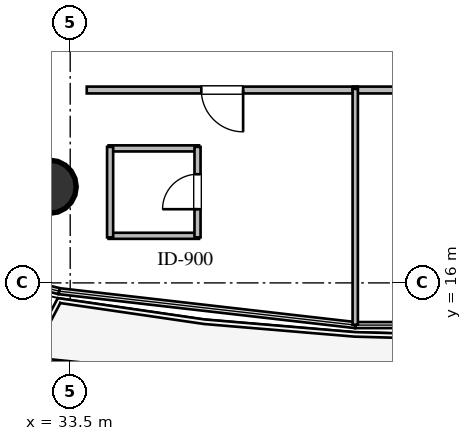
"""IFC4 building model, lengths in metres.
Left out: names, types, materials, properties, quantities, classifications, styles, units other than length and angle.
Written with IfcOpenShell. Run it as: python <this file> out.ifc"""

import sys

from ifc_helpers import new_model, si_unit, direction, frame, frame_2d, origin, origin_2d, place, context, subcontext, project, spatial, rectangle, circle, extrude, element, fill, save


model = new_model("IFC4")
c1 = context("Model", 3, precision=1e-05, world=origin(), true_north=direction((0.0, 1.0)))
c2 = subcontext(c1, "Body", "Model", "MODEL_VIEW")
j1 = project(units=[si_unit("LENGTHUNIT", "METRE"), si_unit("PLANEANGLEUNIT", "RADIAN")], contexts=[c1])
p1 = place(None, origin())
s1 = spatial("IfcSite", under=j1, at=p1, CompositionType="ELEMENT")
p2 = place(p1, origin())
s2 = spatial("IfcBuilding", under=s1, at=p2, CompositionType="ELEMENT")
p3 = place(p2, frame((0.0, 0.0, 31.2)))
s3 = spatial("IfcBuildingStorey", under=s2, at=p3, CompositionType="ELEMENT", Elevation=31.2)
p4 = place(p3, frame((32.96, 18.53, 0.0), z_axis=(0.0, 0.0, 1.0), x_axis=(1.0, 0.0, 0.0)))
e1 = element("IfcColumn", 1, at=p4, inside=s3, PredefinedType="COLUMN", context=c2, shape_type="SweptSolid", body=[
    extrude(circle(Radius=0.7, at=origin_2d()), origin(), (0.0, 0.0, 1.0), 3.6),
])
for number, where, z_axis, x_axis in (
    (2, (34.51, 17.239, 0.0), (0.0, 0.0, 1.0), (1.0, 0.0, 0.0)),
    (3, (34.51, 19.539, 0.0), (0.0, 0.0, 1.0), (1.0, 0.0, 0.0)),
):
    element("IfcWall", number, at=place(p3, frame(where, z_axis=z_axis, x_axis=x_axis)), inside=s3, PredefinedType="PLUMBINGWALL", context=c2, shape_type="SweptSolid", body=[
        extrude(rectangle(XDim=2.38, YDim=0.16, at=frame_2d((1.19, 0.0))), origin(), (0.0, 0.0, 1.0), 3.36),
    ])
p5 = place(p3, frame((34.55, 17.199, 0.0), z_axis=(0.0, 0.0, 1.0), x_axis=(0.0, 1.0, 0.0)))
e4 = element("IfcWall", 4, at=p5, inside=s3, PredefinedType="PLUMBINGWALL", context=c2, shape_type="SweptSolid", body=[
    extrude(rectangle(XDim=2.38, YDim=0.16, at=frame_2d((1.19, 0.0))), origin(), (0.0, 0.0, 1.0), 3.36),
])
p6 = place(p3, frame((36.85, 17.199, 0.0), z_axis=(0.0, 0.0, 1.0), x_axis=(0.0, 1.0, 0.0)))
e5 = element("IfcWall", 5, at=p6, inside=s3, PredefinedType="PLUMBINGWALL", context=c2, shape_type="SweptSolid", body=[
    extrude(rectangle(XDim=2.38, YDim=0.16, at=frame_2d((1.19, 0.0))), origin(), (0.0, 0.0, 1.0), 3.36),
])
p7 = place(p6, frame((0.74, 0.0, 0.0)))
e6 = element("IfcOpeningElement", 6, at=p7, cuts=e5, PredefinedType="OPENING", context=c2, shape_type="SweptSolid", body=[
    extrude(rectangle(XDim=0.92, YDim=2.1, at=frame_2d((0.46, 1.05))), frame((0.0, 0.09, 0.0), z_axis=(0.0, -1.0, 0.0), x_axis=(1.0, 0.0, 0.0)), (0.0, 0.0, 1.0), 0.18),
])
p8 = place(p3, frame((41.065, 21.075, 0.0), z_axis=(0.0, 0.0, 1.0), x_axis=(-1.0, 0.0, 0.0)))
e7 = element("IfcWall", 7, at=p8, inside=s3, PredefinedType="PARTITIONING", context=c2, shape_type="SweptSolid", body=[
    extrude(rectangle(XDim=7.13, YDim=0.18, at=frame_2d((3.565, 0.0))), origin(), (0.0, 0.0, 1.0), 2.996),
])
p9 = place(p8, frame((3.015, 0.0, 0.0)))
e8 = element("IfcOpeningElement", 8, at=p9, cuts=e7, PredefinedType="OPENING", context=c2, shape_type="SweptSolid", body=[
    extrude(rectangle(XDim=1.1, YDim=2.1, at=frame_2d((0.55, 1.05))), frame((0.0, 0.1, 0.0), z_axis=(0.0, -1.0, 0.0), x_axis=(1.0, 0.0, 0.0)), (0.0, 0.0, 1.0), 0.2),
])
p10 = place(p3, frame((46.555, 21.075, 0.0), z_axis=(0.0, 0.0, 1.0), x_axis=(-1.0, 0.0, 0.0)))
e9 = element("IfcWall", 9, at=p10, inside=s3, PredefinedType="PARTITIONING", context=c2, shape_type="SweptSolid", body=[
    extrude(rectangle(XDim=5.62, YDim=0.18, at=frame_2d((2.81, 0.0))), origin(), (0.0, 0.0, 1.0), 3.36),
])
p11 = place(p10, frame((2.21, 0.0, 0.0)))
e10 = element("IfcOpeningElement", 10, at=p11, cuts=e9, PredefinedType="OPENING", context=c2, shape_type="SweptSolid", body=[
    extrude(rectangle(XDim=1.2, YDim=2.15, at=frame_2d((0.6, 1.075))), frame((0.0, 0.1, 0.0), z_axis=(0.0, -1.0, 0.0), x_axis=(1.0, 0.0, 0.0)), (0.0, 0.0, 1.0), 0.2),
])
p12 = place(p3, frame((41.0, 21.105, 0.0), z_axis=(0.0, 0.0, 1.0), x_axis=(0.0, -1.0, 0.0)))
e11 = element("IfcWall", 11, at=p12, inside=s3, PredefinedType="PARTITIONING", context=c2, shape_type="SweptSolid", body=[
    extrude(rectangle(XDim=6.205, YDim=0.14, at=frame_2d((3.103, 0.0))), origin(), (0.0, 0.0, 1.0), 3.36),
])
p13 = place(p7, origin())
e12 = element("IfcDoor", 12, at=p13, inside=s3, OperationType="SINGLE_SWING_LEFT", PredefinedType="DOOR", context=c2, shape_type="SweptSolid", body=[
    extrude(rectangle(XDim=0.92, YDim=2.1, at=frame_2d((0.46, 1.05))), frame((0.0, 0.025, 0.0), z_axis=(0.0, -1.0, 0.0), x_axis=(1.0, 0.0, 0.0)), (0.0, 0.0, 1.0), 0.05),
])
fill(e6, e12)
p14 = place(p9, origin())
e13 = element("IfcDoor", 13, at=p14, inside=s3, OperationType="SINGLE_SWING_LEFT", PredefinedType="DOOR", context=c2, shape_type="SweptSolid", body=[
    extrude(rectangle(XDim=1.1, YDim=2.1, at=frame_2d((0.55, 1.05))), frame((0.0, 0.025, 0.0), z_axis=(0.0, -1.0, 0.0), x_axis=(1.0, 0.0, 0.0)), (0.0, 0.0, 1.0), 0.05),
])
fill(e8, e13)
save(model, sys.argv[1])
